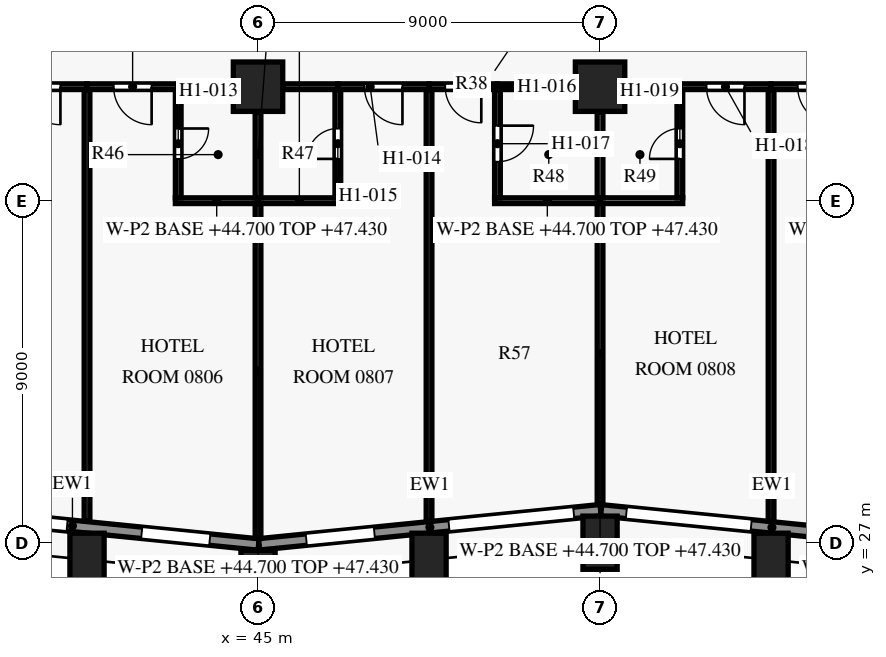
"""IFC4 building model, lengths in metres.
Left out: names, types, materials, properties, quantities, classifications, styles, units other than length and angle.
Written with IfcOpenShell. Run it as: python <this file> out.ifc"""

import sys

from ifc_helpers import new_model, si_unit, direction, frame, frame_2d, origin, origin_2d, place, context, subcontext, project, spatial, rectangle, extrude, element, fill, save


model = new_model("IFC4")
c1 = context("Model", 3, precision=1e-05, world=origin(), true_north=direction((0.0, 1.0)))
c2 = subcontext(c1, "Body", "Model", "MODEL_VIEW")
j1 = project(units=[si_unit("LENGTHUNIT", "METRE"), si_unit("PLANEANGLEUNIT", "RADIAN")], contexts=[c1])
p1 = place(None, origin())
s1 = spatial("IfcSite", under=j1, at=p1, CompositionType="ELEMENT")
p2 = place(p1, origin())
s2 = spatial("IfcBuilding", under=s1, at=p2, CompositionType="ELEMENT")
p3 = place(p2, frame((0.0, 0.0, 44.7)))
s3 = spatial("IfcBuildingStorey", under=s2, at=p3, CompositionType="ELEMENT", Elevation=44.7)
for number, where, z_axis, x_axis in (
    (1, (40.5, 26.55, 0.0), (0.0, 0.0, 1.0), (0.995, -0.1, 0.0)),
    (2, (45.0, 26.1, 0.0), (0.0, 0.0, 1.0), (1.0, 0.0, 0.0)),
    (3, (49.5, 26.55, 0.0), (0.0, 0.0, 1.0), (0.995, 0.1, 0.0)),
    (4, (54.0, 27.0, 0.0), (0.0, 0.0, 1.0), (1.0, 0.0, 0.0)),
    (5, (58.5, 26.55, 0.0), (0.0, 0.0, 1.0), (0.995, -0.1, 0.0)),
):
    element("IfcColumn", number, at=place(p3, frame(where, z_axis=z_axis, x_axis=x_axis)), inside=s3, PredefinedType="COLUMN", context=c2, shape_type="SweptSolid", body=[
        extrude(rectangle(XDim=0.9, YDim=1.4, at=origin_2d()), origin(), (0.0, 0.0, 1.0), 3.6),
    ])
for number, where, z_axis, x_axis in (
    (6, (45.0, 39.0, 0.0), (0.0, 0.0, 1.0), (1.0, 0.0, 0.0)),
    (7, (54.0, 39.0, 0.0), (0.0, 0.0, 1.0), (1.0, 0.0, 0.0)),
):
    element("IfcColumn", number, at=place(p3, frame(where, z_axis=z_axis, x_axis=x_axis)), inside=s3, PredefinedType="COLUMN", context=c2, shape_type="SweptSolid", body=[
        extrude(rectangle(XDim=1.3, YDim=1.3, at=origin_2d()), origin(), (0.0, 0.0, 1.0), 3.6),
    ])
p4 = place(p3, frame((45.015, 26.953, 0.0), z_axis=(0.0, 0.0, 1.0), x_axis=(-0.995036699177, 0.099508629231, 0.0)))
e8 = element("IfcWall", 8, at=p4, inside=s3, PredefinedType="SOLIDWALL", context=c2, shape_type="SweptSolid", body=[
    extrude(rectangle(XDim=9.846, YDim=0.3, at=frame_2d((4.923, 0.0))), origin(), (0.0, 0.0, 1.0), 2.95),
])
p5 = place(p4, frame((1.291, 0.0, 0.75)))
e9 = element("IfcOpeningElement", 9, at=p5, cuts=e8, PredefinedType="OPENING", context=c2, shape_type="SweptSolid", body=[
    extrude(rectangle(XDim=1.8, YDim=1.8, at=frame_2d((0.9, 0.9))), frame((0.0, 0.16, 0.0), z_axis=(0.0, -1.0, 0.0), x_axis=(1.0, 0.0, 0.0)), (0.0, 0.0, 1.0), 0.32),
])
p6 = place(p4, frame((5.064, 0.0, 0.15)))
e10 = element("IfcOpeningElement", 10, at=p6, cuts=e8, PredefinedType="OPENING", context=c2, shape_type="SweptSolid", body=[
    extrude(rectangle(XDim=3.3, YDim=2.4, at=frame_2d((1.65, 1.2))), frame((0.0, 0.16, 0.0), z_axis=(0.0, -1.0, 0.0), x_axis=(1.0, 0.0, 0.0)), (0.0, 0.0, 1.0), 0.32),
])
p7 = place(p3, frame((54.015, 27.856, 0.0), z_axis=(0.0, 0.0, 1.0), x_axis=(-0.995037993253, -0.099495688264, 0.0)))
e11 = element("IfcWall", 11, at=p7, inside=s3, PredefinedType="SOLIDWALL", context=c2, shape_type="SweptSolid", body=[
    extrude(rectangle(XDim=9.03, YDim=0.3, at=frame_2d((4.515, 0.0))), origin(), (0.0, 0.0, 1.0), 2.95),
])
p8 = place(p7, frame((0.711, 0.0, 0.15)))
e12 = element("IfcOpeningElement", 12, at=p8, cuts=e11, PredefinedType="OPENING", context=c2, shape_type="SweptSolid", body=[
    extrude(rectangle(XDim=3.3, YDim=2.4, at=frame_2d((1.65, 1.2))), frame((0.0, 0.16, 0.0), z_axis=(0.0, -1.0, 0.0), x_axis=(1.0, 0.0, 0.0)), (0.0, 0.0, 1.0), 0.32),
])
p9 = place(p7, frame((5.984, 0.0, 0.75)))
e13 = element("IfcOpeningElement", 13, at=p9, cuts=e11, PredefinedType="OPENING", context=c2, shape_type="SweptSolid", body=[
    extrude(rectangle(XDim=1.8, YDim=1.8, at=frame_2d((0.9, 0.9))), frame((0.0, 0.16, 0.0), z_axis=(0.0, -1.0, 0.0), x_axis=(1.0, 0.0, 0.0)), (0.0, 0.0, 1.0), 0.32),
])
p10 = place(p3, frame((63.015, 26.953, 0.0), z_axis=(0.0, 0.0, 1.0), x_axis=(-0.995035316196, 0.099522457379, 0.0)))
e14 = element("IfcWall", 14, at=p10, inside=s3, PredefinedType="SOLIDWALL", context=c2, shape_type="SweptSolid", body=[
    extrude(rectangle(XDim=9.03, YDim=0.3, at=frame_2d((4.515, 0.0))), origin(), (0.0, 0.0, 1.0), 2.95),
])
p11 = place(p10, frame((1.291, 0.0, 0.75)))
e15 = element("IfcOpeningElement", 15, at=p11, cuts=e14, PredefinedType="OPENING", context=c2, shape_type="SweptSolid", body=[
    extrude(rectangle(XDim=1.8, YDim=1.8, at=frame_2d((0.9, 0.9))), frame((0.0, 0.16, 0.0), z_axis=(0.0, -1.0, 0.0), x_axis=(1.0, 0.0, 0.0)), (0.0, 0.0, 1.0), 0.32),
])
p12 = place(p10, frame((5.064, 0.0, 0.15)))
e16 = element("IfcOpeningElement", 16, at=p12, cuts=e14, PredefinedType="OPENING", context=c2, shape_type="SweptSolid", body=[
    extrude(rectangle(XDim=3.3, YDim=2.4, at=frame_2d((1.65, 1.2))), frame((0.0, 0.16, 0.0), z_axis=(0.0, -1.0, 0.0), x_axis=(1.0, 0.0, 0.0)), (0.0, 0.0, 1.0), 0.32),
])
p13 = place(p3, frame((45.0, 35.925, 0.0), z_axis=(0.0, 0.0, 1.0), x_axis=(0.0, -1.0, 0.0)))
e17 = element("IfcWall", 17, at=p13, inside=s3, PredefinedType="PARTITIONING", context=c2, shape_type="SweptSolid", body=[
    extrude(rectangle(XDim=8.8, YDim=0.15, at=frame_2d((4.4, 0.0))), origin(), (0.0, 0.0, 1.0), 2.73),
])
p14 = place(p3, frame((54.0, 35.925, 0.0), z_axis=(0.0, 0.0, 1.0), x_axis=(0.0, -1.0, 0.0)))
e18 = element("IfcWall", 18, at=p14, inside=s3, PredefinedType="PARTITIONING", context=c2, shape_type="SweptSolid", body=[
    extrude(rectangle(XDim=7.9, YDim=0.15, at=frame_2d((3.95, 0.0))), origin(), (0.0, 0.0, 1.0), 2.73),
])
for number, where, z_axis, x_axis in (
    (19, (42.825, 36.0, 0.0), (0.0, 0.0, 1.0), (1.0, 0.0, 0.0)),
    (20, (45.0, 36.0, 0.0), (0.0, 0.0, 1.0), (1.0, 0.0, 0.0)),
):
    element("IfcWall", number, at=place(p3, frame(where, z_axis=z_axis, x_axis=x_axis)), inside=s3, PredefinedType="PARTITIONING", context=c2, shape_type="SweptSolid", body=[
        extrude(rectangle(XDim=2.175, YDim=0.15, at=frame_2d((1.087, 0.0))), origin(), (0.0, 0.0, 1.0), 2.73),
    ])
p15 = place(p3, frame((51.225, 36.0, 0.0), z_axis=(0.0, 0.0, 1.0), x_axis=(1.0, 0.0, 0.0)))
e21 = element("IfcWall", 21, at=p15, inside=s3, PredefinedType="PARTITIONING", context=c2, shape_type="SweptSolid", body=[
    extrude(rectangle(XDim=2.775, YDim=0.15, at=frame_2d((1.387, 0.0))), origin(), (0.0, 0.0, 1.0), 2.73),
])
p16 = place(p3, frame((54.0, 36.0, 0.0), z_axis=(0.0, 0.0, 1.0), x_axis=(1.0, 0.0, 0.0)))
e22 = element("IfcWall", 22, at=p16, inside=s3, PredefinedType="PARTITIONING", context=c2, shape_type="SweptSolid", body=[
    extrude(rectangle(XDim=2.175, YDim=0.15, at=frame_2d((1.087, 0.0))), origin(), (0.0, 0.0, 1.0), 2.73),
])
p17 = place(p3, frame((47.1, 36.075, 0.0), z_axis=(0.0, 0.0, 1.0), x_axis=(0.0, 1.0, 0.0)))
e23 = element("IfcWall", 23, at=p17, inside=s3, PredefinedType="PARTITIONING", context=c2, shape_type="SweptSolid", body=[
    extrude(rectangle(XDim=2.85, YDim=0.15, at=frame_2d((1.425, 0.0))), origin(), (0.0, 0.0, 1.0), 2.58),
])
p18 = place(p17, frame((1.025, 0.0, 0.0)))
e24 = element("IfcOpeningElement", 24, at=p18, cuts=e23, PredefinedType="OPENING", context=c2, shape_type="SweptSolid", body=[
    extrude(rectangle(XDim=0.8, YDim=2.1, at=frame_2d((0.4, 1.05))), frame((0.0, 0.085, 0.0), z_axis=(0.0, -1.0, 0.0), x_axis=(1.0, 0.0, 0.0)), (0.0, 0.0, 1.0), 0.17),
])
p19 = place(p3, frame((56.1, 36.075, 0.0), z_axis=(0.0, 0.0, 1.0), x_axis=(0.0, 1.0, 0.0)))
e25 = element("IfcWall", 25, at=p19, inside=s3, PredefinedType="PARTITIONING", context=c2, shape_type="SweptSolid", body=[
    extrude(rectangle(XDim=2.85, YDim=0.15, at=frame_2d((1.425, 0.0))), origin(), (0.0, 0.0, 1.0), 2.58),
])
p20 = place(p19, frame((1.025, 0.0, 0.0)))
e26 = element("IfcOpeningElement", 26, at=p20, cuts=e25, PredefinedType="OPENING", context=c2, shape_type="SweptSolid", body=[
    extrude(rectangle(XDim=0.8, YDim=2.1, at=frame_2d((0.4, 1.05))), frame((0.0, 0.085, 0.0), z_axis=(0.0, -1.0, 0.0), x_axis=(1.0, 0.0, 0.0)), (0.0, 0.0, 1.0), 0.17),
])
for number, where, z_axis, x_axis in (
    (27, (45.0, 38.345, 0.0), (0.0, 0.0, 1.0), (0.0, -1.0, 0.0)),
    (28, (54.0, 38.345, 0.0), (0.0, 0.0, 1.0), (0.0, -1.0, 0.0)),
):
    element("IfcWall", number, at=place(p3, frame(where, z_axis=z_axis, x_axis=x_axis)), inside=s3, PredefinedType="PARTITIONING", context=c2, shape_type="SweptSolid", body=[
        extrude(rectangle(XDim=2.27, YDim=0.15, at=frame_2d((1.135, 0.0))), origin(), (0.0, 0.0, 1.0), 2.73),
    ])
p21 = place(p3, frame((40.5, 38.925, 0.0), z_axis=(0.0, 0.0, 1.0), x_axis=(0.0, -1.0, 0.0)))
e29 = element("IfcWall", 29, at=p21, inside=s3, PredefinedType="PARTITIONING", context=c2, shape_type="SweptSolid", body=[
    extrude(rectangle(XDim=11.35, YDim=0.15, at=frame_2d((5.675, 0.0))), origin(), (0.0, 0.0, 1.0), 2.58),
])
p22 = place(p3, frame((42.9, 38.925, 0.0), z_axis=(0.0, 0.0, 1.0), x_axis=(0.0, -1.0, 0.0)))
e30 = element("IfcWall", 30, at=p22, inside=s3, PredefinedType="PARTITIONING", context=c2, shape_type="SweptSolid", body=[
    extrude(rectangle(XDim=2.85, YDim=0.15, at=frame_2d((1.425, 0.0))), origin(), (0.0, 0.0, 1.0), 2.58),
])
p23 = place(p22, frame((1.025, 0.0, 0.0)))
e31 = element("IfcOpeningElement", 31, at=p23, cuts=e30, PredefinedType="OPENING", context=c2, shape_type="SweptSolid", body=[
    extrude(rectangle(XDim=0.8, YDim=2.1, at=frame_2d((0.4, 1.05))), frame((0.0, 0.085, 0.0), z_axis=(0.0, -1.0, 0.0), x_axis=(1.0, 0.0, 0.0)), (0.0, 0.0, 1.0), 0.17),
])
p24 = place(p3, frame((49.5, 38.925, 0.0), z_axis=(0.0, 0.0, 1.0), x_axis=(0.0, -1.0, 0.0)))
e32 = element("IfcWall", 32, at=p24, inside=s3, PredefinedType="PARTITIONING", context=c2, shape_type="SweptSolid", body=[
    extrude(rectangle(XDim=11.35, YDim=0.15, at=frame_2d((5.675, 0.0))), origin(), (0.0, 0.0, 1.0), 2.58),
])
p25 = place(p3, frame((51.3, 38.925, 0.0), z_axis=(0.0, 0.0, 1.0), x_axis=(0.0, -1.0, 0.0)))
e33 = element("IfcWall", 33, at=p25, inside=s3, PredefinedType="PARTITIONING", context=c2, shape_type="SweptSolid", body=[
    extrude(rectangle(XDim=2.85, YDim=0.15, at=frame_2d((1.425, 0.0))), origin(), (0.0, 0.0, 1.0), 2.58),
])
p26 = place(p25, frame((0.95, 0.0, 0.0)))
e34 = element("IfcOpeningElement", 34, at=p26, cuts=e33, PredefinedType="OPENING", context=c2, shape_type="SweptSolid", body=[
    extrude(rectangle(XDim=0.95, YDim=2.1, at=frame_2d((0.475, 1.05))), frame((0.0, 0.085, 0.0), z_axis=(0.0, -1.0, 0.0), x_axis=(1.0, 0.0, 0.0)), (0.0, 0.0, 1.0), 0.17),
])
p27 = place(p3, frame((58.5, 38.925, 0.0), z_axis=(0.0, 0.0, 1.0), x_axis=(0.0, -1.0, 0.0)))
e35 = element("IfcWall", 35, at=p27, inside=s3, PredefinedType="PARTITIONING", context=c2, shape_type="SweptSolid", body=[
    extrude(rectangle(XDim=11.35, YDim=0.15, at=frame_2d((5.675, 0.0))), origin(), (0.0, 0.0, 1.0), 2.58),
])
p28 = place(p3, frame((40.5, 39.0, 0.0), z_axis=(0.0, 0.0, 1.0), x_axis=(-1.0, 0.0, 0.0)))
e36 = element("IfcWall", 36, at=p28, inside=s3, PredefinedType="PARTITIONING", context=c2, shape_type="SweptSolid", body=[
    extrude(rectangle(XDim=2.4, YDim=0.15, at=frame_2d((1.2, 0.0))), origin(), (0.0, 0.0, 1.0), 2.58),
])
p29 = place(p28, frame((0.7, 0.0, 0.0)))
e37 = element("IfcOpeningElement", 37, at=p29, cuts=e36, PredefinedType="OPENING", context=c2, shape_type="SweptSolid", body=[
    extrude(rectangle(XDim=1.0, YDim=2.1, at=frame_2d((0.5, 1.05))), frame((0.0, 0.085, 0.0), z_axis=(0.0, -1.0, 0.0), x_axis=(1.0, 0.0, 0.0)), (0.0, 0.0, 1.0), 0.17),
])
p30 = place(p3, frame((42.9, 39.0, 0.0), z_axis=(0.0, 0.0, 1.0), x_axis=(-1.0, 0.0, 0.0)))
e38 = element("IfcWall", 38, at=p30, inside=s3, PredefinedType="PARTITIONING", context=c2, shape_type="SweptSolid", body=[
    extrude(rectangle(XDim=2.4, YDim=0.15, at=frame_2d((1.2, 0.0))), origin(), (0.0, 0.0, 1.0), 2.58),
])
p31 = place(p30, frame((0.7, 0.0, 0.0)))
e39 = element("IfcOpeningElement", 39, at=p31, cuts=e38, PredefinedType="OPENING", context=c2, shape_type="SweptSolid", body=[
    extrude(rectangle(XDim=1.0, YDim=2.1, at=frame_2d((0.5, 1.05))), frame((0.0, 0.085, 0.0), z_axis=(0.0, -1.0, 0.0), x_axis=(1.0, 0.0, 0.0)), (0.0, 0.0, 1.0), 0.17),
])
for number, where, z_axis, x_axis in (
    (40, (44.345, 39.0, 0.0), (0.0, 0.0, 1.0), (-1.0, 0.0, 0.0)),
    (41, (47.1, 39.0, 0.0), (0.0, 0.0, 1.0), (-1.0, 0.0, 0.0)),
):
    element("IfcWall", number, at=place(p3, frame(where, z_axis=z_axis, x_axis=x_axis)), inside=s3, PredefinedType="PARTITIONING", context=c2, shape_type="SweptSolid", body=[
        extrude(rectangle(XDim=1.445, YDim=0.15, at=frame_2d((0.723, 0.0))), origin(), (0.0, 0.0, 1.0), 2.58),
    ])
p32 = place(p3, frame((49.5, 39.0, 0.0), z_axis=(0.0, 0.0, 1.0), x_axis=(-1.0, 0.0, 0.0)))
e42 = element("IfcWall", 42, at=p32, inside=s3, PredefinedType="PARTITIONING", context=c2, shape_type="SweptSolid", body=[
    extrude(rectangle(XDim=2.4, YDim=0.15, at=frame_2d((1.2, 0.0))), origin(), (0.0, 0.0, 1.0), 2.58),
])
p33 = place(p32, frame((0.7, 0.0, 0.0)))
e43 = element("IfcOpeningElement", 43, at=p33, cuts=e42, PredefinedType="OPENING", context=c2, shape_type="SweptSolid", body=[
    extrude(rectangle(XDim=1.0, YDim=2.1, at=frame_2d((0.5, 1.05))), frame((0.0, 0.085, 0.0), z_axis=(0.0, -1.0, 0.0), x_axis=(1.0, 0.0, 0.0)), (0.0, 0.0, 1.0), 0.17),
])
p34 = place(p3, frame((51.3, 39.0, 0.0), z_axis=(0.0, 0.0, 1.0), x_axis=(-1.0, 0.0, 0.0)))
e44 = element("IfcWall", 44, at=p34, inside=s3, PredefinedType="PARTITIONING", context=c2, shape_type="SweptSolid", body=[
    extrude(rectangle(XDim=1.8, YDim=0.15, at=frame_2d((0.9, 0.0))), origin(), (0.0, 0.0, 1.0), 2.58),
])
p35 = place(p34, frame((0.425, 0.0, 0.0)))
e45 = element("IfcOpeningElement", 45, at=p35, cuts=e44, PredefinedType="OPENING", context=c2, shape_type="SweptSolid", body=[
    extrude(rectangle(XDim=0.95, YDim=2.1, at=frame_2d((0.475, 1.05))), frame((0.0, 0.085, 0.0), z_axis=(0.0, -1.0, 0.0), x_axis=(1.0, 0.0, 0.0)), (0.0, 0.0, 1.0), 0.17),
])
p36 = place(p3, frame((53.345, 39.0, 0.0), z_axis=(0.0, 0.0, 1.0), x_axis=(-1.0, 0.0, 0.0)))
e46 = element("IfcWall", 46, at=p36, inside=s3, PredefinedType="PARTITIONING", context=c2, shape_type="SweptSolid", body=[
    extrude(rectangle(XDim=2.045, YDim=0.15, at=frame_2d((1.022, 0.0))), origin(), (0.0, 0.0, 1.0), 2.58),
])
p37 = place(p3, frame((56.1, 39.0, 0.0), z_axis=(0.0, 0.0, 1.0), x_axis=(-1.0, 0.0, 0.0)))
e47 = element("IfcWall", 47, at=p37, inside=s3, PredefinedType="PARTITIONING", context=c2, shape_type="SweptSolid", body=[
    extrude(rectangle(XDim=1.445, YDim=0.15, at=frame_2d((0.723, 0.0))), origin(), (0.0, 0.0, 1.0), 2.58),
])
p38 = place(p3, frame((58.5, 39.0, 0.0), z_axis=(0.0, 0.0, 1.0), x_axis=(-1.0, 0.0, 0.0)))
e48 = element("IfcWall", 48, at=p38, inside=s3, PredefinedType="PARTITIONING", context=c2, shape_type="SweptSolid", body=[
    extrude(rectangle(XDim=2.4, YDim=0.15, at=frame_2d((1.2, 0.0))), origin(), (0.0, 0.0, 1.0), 2.58),
])
p39 = place(p38, frame((0.7, 0.0, 0.0)))
e49 = element("IfcOpeningElement", 49, at=p39, cuts=e48, PredefinedType="OPENING", context=c2, shape_type="SweptSolid", body=[
    extrude(rectangle(XDim=1.0, YDim=2.1, at=frame_2d((0.5, 1.05))), frame((0.0, 0.085, 0.0), z_axis=(0.0, -1.0, 0.0), x_axis=(1.0, 0.0, 0.0)), (0.0, 0.0, 1.0), 0.17),
])
p40 = place(p3, frame((60.9, 39.0, 0.0), z_axis=(0.0, 0.0, 1.0), x_axis=(-1.0, 0.0, 0.0)))
e50 = element("IfcWall", 50, at=p40, inside=s3, PredefinedType="PARTITIONING", context=c2, shape_type="SweptSolid", body=[
    extrude(rectangle(XDim=2.4, YDim=0.15, at=frame_2d((1.2, 0.0))), origin(), (0.0, 0.0, 1.0), 2.58),
])
p41 = place(p40, frame((0.7, 0.0, 0.0)))
e51 = element("IfcOpeningElement", 51, at=p41, cuts=e50, PredefinedType="OPENING", context=c2, shape_type="SweptSolid", body=[
    extrude(rectangle(XDim=1.0, YDim=2.1, at=frame_2d((0.5, 1.05))), frame((0.0, 0.085, 0.0), z_axis=(0.0, -1.0, 0.0), x_axis=(1.0, 0.0, 0.0)), (0.0, 0.0, 1.0), 0.17),
])
p42 = place(p5, origin())
e52 = element("IfcWindow", 52, at=p42, inside=s3, PartitioningType="SINGLE_PANEL", PredefinedType="WINDOW", context=c2, shape_type="SweptSolid", body=[
    extrude(rectangle(XDim=1.8, YDim=1.8, at=frame_2d((0.9, 0.9))), frame((0.0, 0.03, 0.0), z_axis=(0.0, -1.0, 0.0), x_axis=(1.0, 0.0, 0.0)), (0.0, 0.0, 1.0), 0.06),
])
fill(e9, e52)
p43 = place(p6, origin())
e53 = element("IfcWindow", 53, at=p43, inside=s3, PartitioningType="SINGLE_PANEL", PredefinedType="WINDOW", context=c2, shape_type="SweptSolid", body=[
    extrude(rectangle(XDim=3.3, YDim=2.4, at=frame_2d((1.65, 1.2))), frame((0.0, 0.03, 0.0), z_axis=(0.0, -1.0, 0.0), x_axis=(1.0, 0.0, 0.0)), (0.0, 0.0, 1.0), 0.06),
])
fill(e10, e53)
p44 = place(p8, origin())
e54 = element("IfcWindow", 54, at=p44, inside=s3, PartitioningType="SINGLE_PANEL", PredefinedType="WINDOW", context=c2, shape_type="SweptSolid", body=[
    extrude(rectangle(XDim=3.3, YDim=2.4, at=frame_2d((1.65, 1.2))), frame((0.0, 0.03, 0.0), z_axis=(0.0, -1.0, 0.0), x_axis=(1.0, 0.0, 0.0)), (0.0, 0.0, 1.0), 0.06),
])
fill(e12, e54)
p45 = place(p9, origin())
e55 = element("IfcWindow", 55, at=p45, inside=s3, PartitioningType="SINGLE_PANEL", PredefinedType="WINDOW", context=c2, shape_type="SweptSolid", body=[
    extrude(rectangle(XDim=1.8, YDim=1.8, at=frame_2d((0.9, 0.9))), frame((0.0, 0.03, 0.0), z_axis=(0.0, -1.0, 0.0), x_axis=(1.0, 0.0, 0.0)), (0.0, 0.0, 1.0), 0.06),
])
fill(e13, e55)
p46 = place(p12, origin())
e56 = element("IfcWindow", 56, at=p46, inside=s3, PartitioningType="SINGLE_PANEL", PredefinedType="WINDOW", context=c2, shape_type="SweptSolid", body=[
    extrude(rectangle(XDim=3.3, YDim=2.4, at=frame_2d((1.65, 1.2))), frame((0.0, 0.03, 0.0), z_axis=(0.0, -1.0, 0.0), x_axis=(1.0, 0.0, 0.0)), (0.0, 0.0, 1.0), 0.06),
])
fill(e16, e56)
p47 = place(p29, origin())
e57 = element("IfcDoor", 57, at=p47, inside=s3, OperationType="SINGLE_SWING_LEFT", PredefinedType="DOOR", context=c2, shape_type="SweptSolid", body=[
    extrude(rectangle(XDim=1.0, YDim=2.1, at=frame_2d((0.5, 1.05))), frame((0.0, 0.025, 0.0), z_axis=(0.0, -1.0, 0.0), x_axis=(1.0, 0.0, 0.0)), (0.0, 0.0, 1.0), 0.05),
])
fill(e37, e57)
p48 = place(p31, origin())
e58 = element("IfcDoor", 58, at=p48, inside=s3, OperationType="SINGLE_SWING_LEFT", PredefinedType="DOOR", context=c2, shape_type="SweptSolid", body=[
    extrude(rectangle(XDim=1.0, YDim=2.1, at=frame_2d((0.5, 1.05))), frame((0.0, 0.025, 0.0), z_axis=(0.0, -1.0, 0.0), x_axis=(1.0, 0.0, 0.0)), (0.0, 0.0, 1.0), 0.05),
])
fill(e39, e58)
p49 = place(p23, origin())
e59 = element("IfcDoor", 59, at=p49, inside=s3, OperationType="SINGLE_SWING_LEFT", PredefinedType="DOOR", context=c2, shape_type="SweptSolid", body=[
    extrude(rectangle(XDim=0.8, YDim=2.1, at=frame_2d((0.4, 1.05))), frame((0.0, 0.025, 0.0), z_axis=(0.0, -1.0, 0.0), x_axis=(1.0, 0.0, 0.0)), (0.0, 0.0, 1.0), 0.05),
])
fill(e31, e59)
p50 = place(p33, origin())
e60 = element("IfcDoor", 60, at=p50, inside=s3, OperationType="SINGLE_SWING_LEFT", PredefinedType="DOOR", context=c2, shape_type="SweptSolid", body=[
    extrude(rectangle(XDim=1.0, YDim=2.1, at=frame_2d((0.5, 1.05))), frame((0.0, 0.025, 0.0), z_axis=(0.0, -1.0, 0.0), x_axis=(1.0, 0.0, 0.0)), (0.0, 0.0, 1.0), 0.05),
])
fill(e43, e60)
p51 = place(p18, origin())
e61 = element("IfcDoor", 61, at=p51, inside=s3, OperationType="SINGLE_SWING_LEFT", PredefinedType="DOOR", context=c2, shape_type="SweptSolid", body=[
    extrude(rectangle(XDim=0.8, YDim=2.1, at=frame_2d((0.4, 1.05))), frame((0.0, 0.025, 0.0), z_axis=(0.0, -1.0, 0.0), x_axis=(1.0, 0.0, 0.0)), (0.0, 0.0, 1.0), 0.05),
])
fill(e24, e61)
p52 = place(p35, origin())
e62 = element("IfcDoor", 62, at=p52, inside=s3, OperationType="SINGLE_SWING_LEFT", PredefinedType="DOOR", context=c2, shape_type="SweptSolid", body=[
    extrude(rectangle(XDim=0.95, YDim=2.1, at=frame_2d((0.475, 1.05))), frame((0.0, 0.025, 0.0), z_axis=(0.0, -1.0, 0.0), x_axis=(1.0, 0.0, 0.0)), (0.0, 0.0, 1.0), 0.05),
])
fill(e45, e62)
p53 = place(p26, origin())
e63 = element("IfcDoor", 63, at=p53, inside=s3, OperationType="SINGLE_SWING_LEFT", PredefinedType="DOOR", context=c2, shape_type="SweptSolid", body=[
    extrude(rectangle(XDim=0.95, YDim=2.1, at=frame_2d((0.475, 1.05))), frame((0.0, 0.025, 0.0), z_axis=(0.0, -1.0, 0.0), x_axis=(1.0, 0.0, 0.0)), (0.0, 0.0, 1.0), 0.05),
])
fill(e34, e63)
p54 = place(p39, origin())
e64 = element("IfcDoor", 64, at=p54, inside=s3, OperationType="SINGLE_SWING_LEFT", PredefinedType="DOOR", context=c2, shape_type="SweptSolid", body=[
    extrude(rectangle(XDim=1.0, YDim=2.1, at=frame_2d((0.5, 1.05))), frame((0.0, 0.025, 0.0), z_axis=(0.0, -1.0, 0.0), x_axis=(1.0, 0.0, 0.0)), (0.0, 0.0, 1.0), 0.05),
])
fill(e49, e64)
p55 = place(p20, origin())
e65 = element("IfcDoor", 65, at=p55, inside=s3, OperationType="SINGLE_SWING_LEFT", PredefinedType="DOOR", context=c2, shape_type="SweptSolid", body=[
    extrude(rectangle(XDim=0.8, YDim=2.1, at=frame_2d((0.4, 1.05))), frame((0.0, 0.025, 0.0), z_axis=(0.0, -1.0, 0.0), x_axis=(1.0, 0.0, 0.0)), (0.0, 0.0, 1.0), 0.05),
])
fill(e26, e65)
p56 = place(p41, origin())
e66 = element("IfcDoor", 66, at=p56, inside=s3, OperationType="SINGLE_SWING_LEFT", PredefinedType="DOOR", context=c2, shape_type="SweptSolid", body=[
    extrude(rectangle(XDim=1.0, YDim=2.1, at=frame_2d((0.5, 1.05))), frame((0.0, 0.025, 0.0), z_axis=(0.0, -1.0, 0.0), x_axis=(1.0, 0.0, 0.0)), (0.0, 0.0, 1.0), 0.05),
])
fill(e51, e66)
save(model, sys.argv[1])
